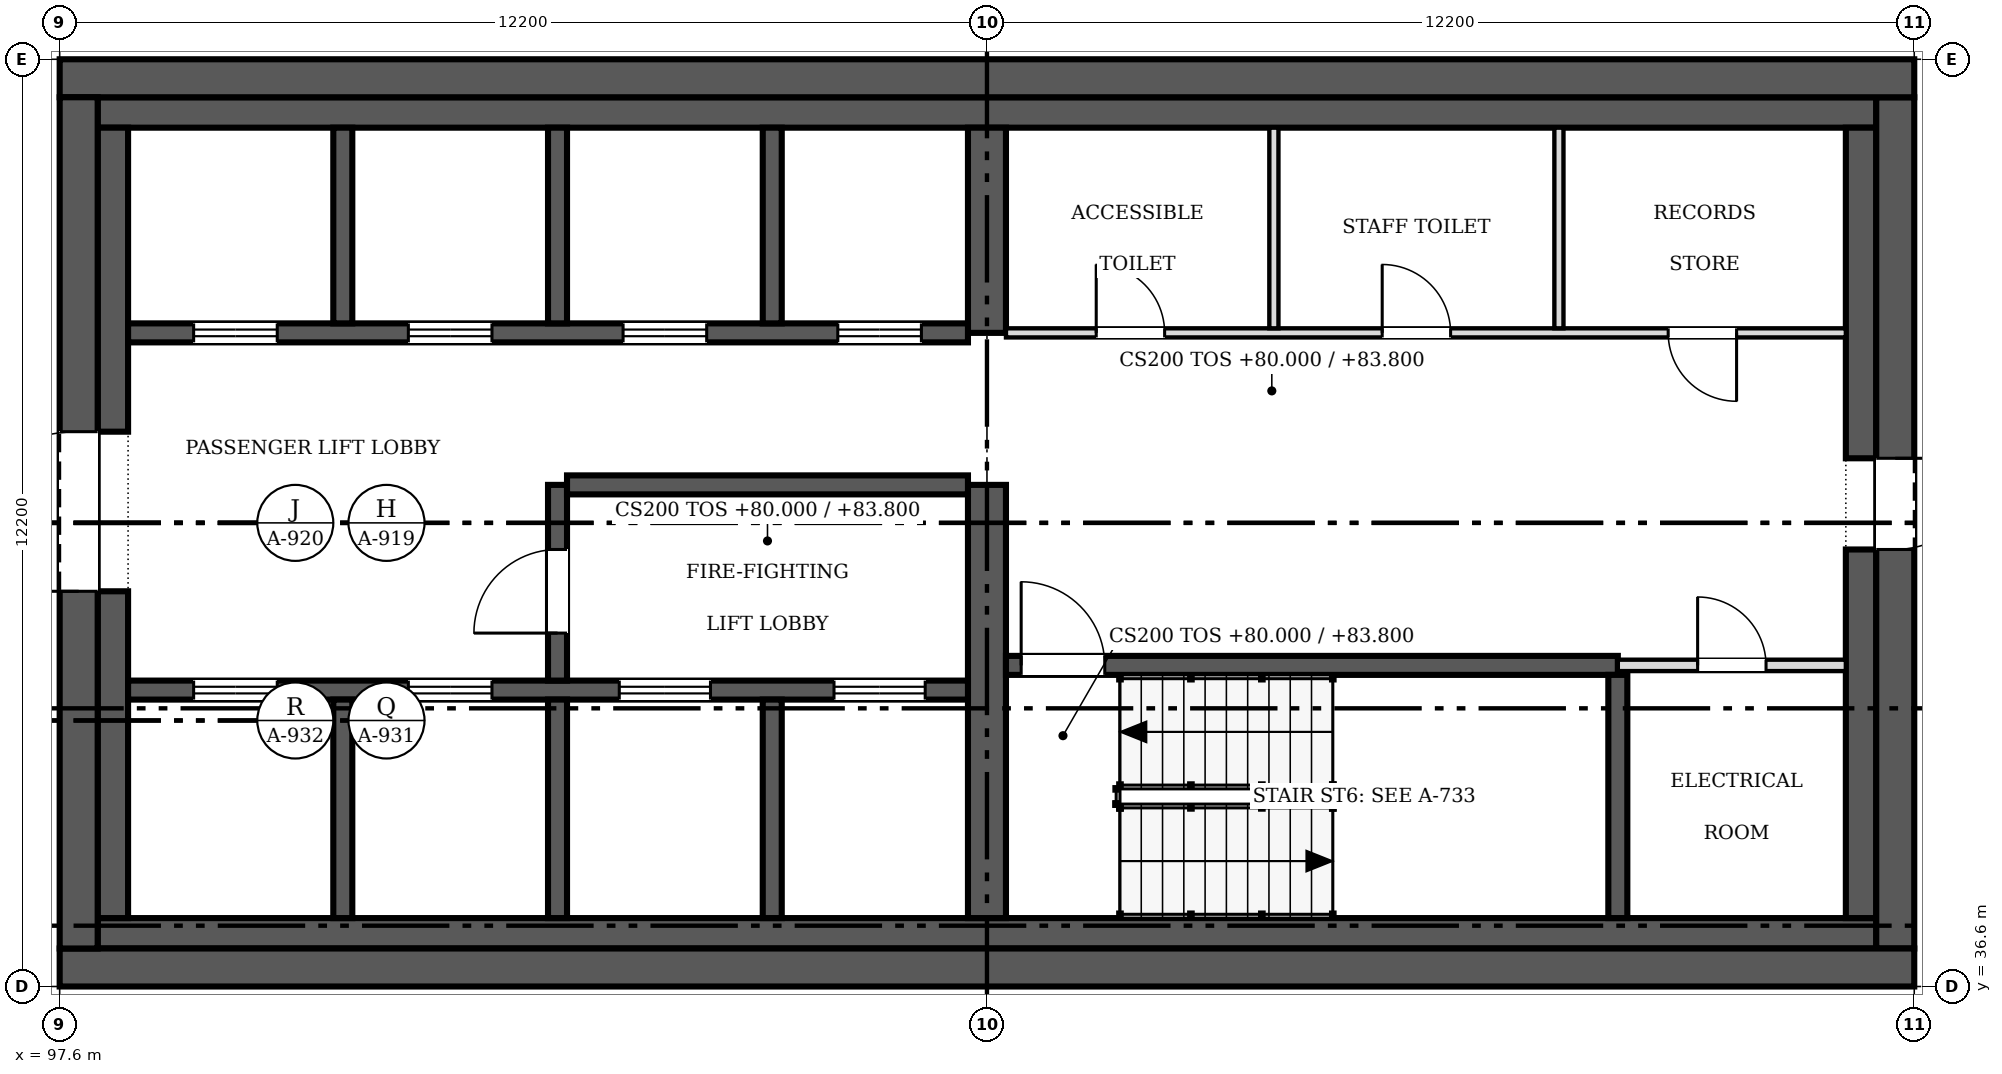
"""IFC4 building model, lengths in metres.
Left out: names, types, materials, properties, quantities, classifications, styles, units other than length and angle.
Written with IfcOpenShell. Run it as: python <this file> out.ifc"""

import sys

from ifc_helpers import new_model, si_unit, direction, frame, frame_2d, origin, place, context, subcontext, project, spatial, rectangle, extrude, source, transform, mapped, element, fill, save


model = new_model("IFC4")
c1 = context("Model", 3, precision=1e-05, world=origin(), true_north=direction((0.0, 1.0)))
c2 = subcontext(c1, "Body", "Model", "MODEL_VIEW")
j1 = project(units=[si_unit("LENGTHUNIT", "METRE"), si_unit("PLANEANGLEUNIT", "RADIAN")], contexts=[c1])
p1 = place(None, origin())
s1 = spatial("IfcSite", under=j1, at=p1, CompositionType="ELEMENT")
p2 = place(p1, origin())
s2 = spatial("IfcBuilding", under=s1, at=p2, CompositionType="ELEMENT")
p3 = place(p2, frame((0.0, 0.0, 80.0)))
s3 = spatial("IfcBuildingStorey", under=s2, at=p3, CompositionType="ELEMENT", Elevation=80.0)
p4 = place(p3, frame((122.0, 36.85, 0.0), z_axis=(0.0, 0.0, 1.0), x_axis=(-1.0, 0.0, 0.0)))
e1 = element("IfcWall", 1, at=p4, inside=s3, PredefinedType="SHEAR", context=c2, shape_type="SweptSolid", body=[
    extrude(rectangle(XDim=24.4, YDim=0.5, at=frame_2d((12.2, 0.0))), origin(), (0.0, 0.0, 1.0), 3.8),
])
p5 = place(p3, frame((97.85, 37.1, 0.0), z_axis=(0.0, 0.0, 1.0), x_axis=(0.0, 1.0, 0.0)))
e2 = element("IfcWall", 2, at=p5, inside=s3, PredefinedType="SHEAR", context=c2, shape_type="SweptSolid", body=[
    extrude(rectangle(XDim=11.2, YDim=0.5, at=frame_2d((5.6, 0.0))), origin(), (0.0, 0.0, 1.0), 3.8),
])
m1 = source(origin(), c2, "Body", "SweptSolid", [
    extrude(rectangle(XDim=2.1, YDim=2.4, at=frame_2d((1.05, 1.2))), frame((0.0, 0.26, 0.0), z_axis=(0.0, -1.0, 0.0), x_axis=(1.0, 0.0, 0.0)), (0.0, 0.0, 1.0), 0.52),
])
p6 = place(p5, frame((4.7, 0.0, 0.0)))
e3 = element("IfcOpeningElement", 3, at=p6, cuts=e2, PredefinedType="OPENING", context=c2, shape_type="MappedRepresentation", body=[
    mapped(m1, transform((0.0, 0.0, 0.0), scale=1.0)),
])
p7 = place(p3, frame((97.6, 48.55, 0.0), z_axis=(0.0, 0.0, 1.0), x_axis=(1.0, 0.0, 0.0)))
e4 = element("IfcWall", 4, at=p7, inside=s3, PredefinedType="SHEAR", context=c2, shape_type="SweptSolid", body=[
    extrude(rectangle(XDim=24.4, YDim=0.5, at=frame_2d((12.2, 0.0))), origin(), (0.0, 0.0, 1.0), 3.8),
])
p8 = place(p3, frame((121.75, 48.3, 0.0), z_axis=(0.0, 0.0, 1.0), x_axis=(0.0, -1.0, 0.0)))
e5 = element("IfcWall", 5, at=p8, inside=s3, PredefinedType="SHEAR", context=c2, shape_type="SweptSolid", body=[
    extrude(rectangle(XDim=11.2, YDim=0.5, at=frame_2d((5.6, 0.0))), origin(), (0.0, 0.0, 1.0), 3.8),
])
m2 = source(origin(), c2, "Body", "SweptSolid", [
    extrude(rectangle(XDim=1.2, YDim=2.1, at=frame_2d((0.6, 1.05))), frame((0.0, 0.26, 0.0), z_axis=(0.0, -1.0, 0.0), x_axis=(1.0, 0.0, 0.0)), (0.0, 0.0, 1.0), 0.52),
])
p9 = place(p8, frame((4.75, 0.0, 0.0)))
e6 = element("IfcOpeningElement", 6, at=p9, cuts=e5, PredefinedType="OPENING", context=c2, shape_type="MappedRepresentation", body=[
    mapped(m2, transform((0.0, 0.0, 0.0), scale=1.0)),
])
for number, where, z_axis, x_axis in (
    (7, (98.1, 37.3, 0.0), (0.0, 0.0, 1.0), (1.0, 0.0, 0.0)),
    (8, (98.1, 48.1, 0.0), (0.0, 0.0, 1.0), (1.0, 0.0, 0.0)),
):
    element("IfcWall", number, at=place(p3, frame(where, z_axis=z_axis, x_axis=x_axis)), inside=s3, PredefinedType="SOLIDWALL", context=c2, shape_type="SweptSolid", body=[
        extrude(rectangle(XDim=23.4, YDim=0.4, at=frame_2d((11.7, 0.0))), origin(), (0.0, 0.0, 1.0), 3.8),
    ])
p10 = place(p3, frame((98.3, 37.5, 0.0), z_axis=(0.0, 0.0, 1.0), x_axis=(0.0, 1.0, 0.0)))
e9 = element("IfcWall", 9, at=p10, inside=s3, PredefinedType="SOLIDWALL", context=c2, shape_type="SweptSolid", body=[
    extrude(rectangle(XDim=4.3, YDim=0.4, at=frame_2d((2.15, 0.0))), origin(), (0.0, 0.0, 1.0), 3.8),
])
p11 = place(p3, frame((98.3, 43.9, 0.0), z_axis=(0.0, 0.0, 1.0), x_axis=(0.0, 1.0, 0.0)))
e10 = element("IfcWall", 10, at=p11, inside=s3, PredefinedType="SOLIDWALL", context=c2, shape_type="SweptSolid", body=[
    extrude(rectangle(XDim=4.0, YDim=0.4, at=frame_2d((2.0, 0.0))), origin(), (0.0, 0.0, 1.0), 3.8),
])
p12 = place(p3, frame((121.3, 37.5, 0.0), z_axis=(0.0, 0.0, 1.0), x_axis=(0.0, 1.0, 0.0)))
e11 = element("IfcWall", 11, at=p12, inside=s3, PredefinedType="SOLIDWALL", context=c2, shape_type="SweptSolid", body=[
    extrude(rectangle(XDim=4.85, YDim=0.4, at=frame_2d((2.425, 0.0))), origin(), (0.0, 0.0, 1.0), 3.8),
])
p13 = place(p3, frame((121.3, 43.55, 0.0), z_axis=(0.0, 0.0, 1.0), x_axis=(0.0, 1.0, 0.0)))
e12 = element("IfcWall", 12, at=p13, inside=s3, PredefinedType="SOLIDWALL", context=c2, shape_type="SweptSolid", body=[
    extrude(rectangle(XDim=4.35, YDim=0.4, at=frame_2d((2.175, 0.0))), origin(), (0.0, 0.0, 1.0), 3.8),
])
p14 = place(p3, frame((109.8, 37.5, 0.0), z_axis=(0.0, 0.0, 1.0), x_axis=(0.0, 1.0, 0.0)))
e13 = element("IfcWall", 13, at=p14, inside=s3, PredefinedType="SHEAR", context=c2, shape_type="SweptSolid", body=[
    extrude(rectangle(XDim=5.7, YDim=0.5, at=frame_2d((2.85, 0.0))), origin(), (0.0, 0.0, 1.0), 3.8),
])
p15 = place(p3, frame((109.8, 45.2, 0.0), z_axis=(0.0, 0.0, 1.0), x_axis=(0.0, 1.0, 0.0)))
e14 = element("IfcWall", 14, at=p15, inside=s3, PredefinedType="SHEAR", context=c2, shape_type="SweptSolid", body=[
    extrude(rectangle(XDim=2.7, YDim=0.5, at=frame_2d((1.35, 0.0))), origin(), (0.0, 0.0, 1.0), 3.8),
])
p16 = place(p3, frame((98.5, 40.5, 0.0), z_axis=(0.0, 0.0, 1.0), x_axis=(1.0, 0.0, 0.0)))
e15 = element("IfcWall", 15, at=p16, inside=s3, PredefinedType="SOLIDWALL", context=c2, shape_type="SweptSolid", body=[
    extrude(rectangle(XDim=11.05, YDim=0.25, at=frame_2d((5.525, 0.0))), origin(), (0.0, 0.0, 1.0), 3.8),
])
m3 = source(origin(), c2, "Body", "SweptSolid", [
    extrude(rectangle(XDim=1.1, YDim=2.1, at=frame_2d((0.55, 1.05))), frame((0.0, 0.135, 0.0), z_axis=(0.0, -1.0, 0.0), x_axis=(1.0, 0.0, 0.0)), (0.0, 0.0, 1.0), 0.27),
])
p17 = place(p16, frame((0.863, 0.0, 0.0)))
e16 = element("IfcOpeningElement", 16, at=p17, cuts=e15, PredefinedType="OPENING", context=c2, shape_type="MappedRepresentation", body=[
    mapped(m3, transform((0.0, 0.0, 0.0), scale=1.0)),
])
p18 = place(p16, frame((3.688, 0.0, 0.0)))
e17 = element("IfcOpeningElement", 17, at=p18, cuts=e15, PredefinedType="OPENING", context=c2, shape_type="MappedRepresentation", body=[
    mapped(m3, transform((0.0, 0.0, 0.0), scale=1.0)),
])
m4 = source(origin(), c2, "Body", "SweptSolid", [
    extrude(rectangle(XDim=1.2, YDim=2.1, at=frame_2d((0.6, 1.05))), frame((0.0, 0.135, 0.0), z_axis=(0.0, -1.0, 0.0), x_axis=(1.0, 0.0, 0.0)), (0.0, 0.0, 1.0), 0.27),
])
p19 = place(p16, frame((6.462, 0.0, 0.0)))
e18 = element("IfcOpeningElement", 18, at=p19, cuts=e15, PredefinedType="OPENING", context=c2, shape_type="MappedRepresentation", body=[
    mapped(m4, transform((0.0, 0.0, 0.0), scale=1.0)),
])
p20 = place(p16, frame((9.288, 0.0, 0.0)))
e19 = element("IfcOpeningElement", 19, at=p20, cuts=e15, PredefinedType="OPENING", context=c2, shape_type="MappedRepresentation", body=[
    mapped(m4, transform((0.0, 0.0, 0.0), scale=1.0)),
])
p21 = place(p3, frame((109.55, 45.2, 0.0), z_axis=(0.0, 0.0, 1.0), x_axis=(-1.0, 0.0, 0.0)))
e20 = element("IfcWall", 20, at=p21, inside=s3, PredefinedType="SOLIDWALL", context=c2, shape_type="SweptSolid", body=[
    extrude(rectangle(XDim=11.05, YDim=0.25, at=frame_2d((5.525, 0.0))), origin(), (0.0, 0.0, 1.0), 3.8),
])
p22 = place(p21, frame((9.087, 0.0, 0.0)))
e21 = element("IfcOpeningElement", 21, at=p22, cuts=e20, PredefinedType="OPENING", context=c2, shape_type="MappedRepresentation", body=[
    mapped(m3, transform((0.0, 0.0, 0.0), scale=1.0)),
])
p23 = place(p21, frame((6.262, 0.0, 0.0)))
e22 = element("IfcOpeningElement", 22, at=p23, cuts=e20, PredefinedType="OPENING", context=c2, shape_type="MappedRepresentation", body=[
    mapped(m3, transform((0.0, 0.0, 0.0), scale=1.0)),
])
p24 = place(p21, frame((3.438, 0.0, 0.0)))
e23 = element("IfcOpeningElement", 23, at=p24, cuts=e20, PredefinedType="OPENING", context=c2, shape_type="MappedRepresentation", body=[
    mapped(m3, transform((0.0, 0.0, 0.0), scale=1.0)),
])
p25 = place(p21, frame((0.613, 0.0, 0.0)))
e24 = element("IfcOpeningElement", 24, at=p25, cuts=e20, PredefinedType="OPENING", context=c2, shape_type="MappedRepresentation", body=[
    mapped(m3, transform((0.0, 0.0, 0.0), scale=1.0)),
])
p26 = place(p3, frame((118.1, 40.825, 0.0), z_axis=(0.0, 0.0, 1.0), x_axis=(-1.0, 0.0, 0.0)))
e25 = element("IfcWall", 25, at=p26, inside=s3, PredefinedType="SOLIDWALL", context=c2, shape_type="SweptSolid", body=[
    extrude(rectangle(XDim=8.05, YDim=0.25, at=frame_2d((4.025, 0.0))), origin(), (0.0, 0.0, 1.0), 3.8),
])
p27 = place(p26, frame((6.75, 0.0, 0.0)))
e26 = element("IfcOpeningElement", 26, at=p27, cuts=e25, PredefinedType="OPENING", context=c2, shape_type="MappedRepresentation", body=[
    mapped(m3, transform((0.0, 0.0, 0.0), scale=1.0)),
])
p28 = place(p3, frame((104.15, 37.5, 0.0), z_axis=(0.0, 0.0, 1.0), x_axis=(0.0, 1.0, 0.0)))
e27 = element("IfcWall", 27, at=p28, inside=s3, PredefinedType="SOLIDWALL", context=c2, shape_type="SweptSolid", body=[
    extrude(rectangle(XDim=2.875, YDim=0.25, at=frame_2d((1.438, 0.0))), origin(), (0.0, 0.0, 1.0), 3.8),
])
p29 = place(p3, frame((104.15, 43.2, 0.0), z_axis=(0.0, 0.0, 1.0), x_axis=(0.0, -1.0, 0.0)))
e28 = element("IfcWall", 28, at=p29, inside=s3, PredefinedType="SOLIDWALL", context=c2, shape_type="SweptSolid", body=[
    extrude(rectangle(XDim=2.575, YDim=0.25, at=frame_2d((1.288, 0.0))), origin(), (0.0, 0.0, 1.0), 3.8),
])
p30 = place(p29, frame((0.85, 0.0, 0.0)))
e29 = element("IfcOpeningElement", 29, at=p30, cuts=e28, PredefinedType="OPENING", context=c2, shape_type="MappedRepresentation", body=[
    mapped(m3, transform((0.0, 0.0, 0.0), scale=1.0)),
])
p31 = place(p3, frame((104.275, 43.2, 0.0), z_axis=(0.0, 0.0, 1.0), x_axis=(1.0, 0.0, 0.0)))
e30 = element("IfcWall", 30, at=p31, inside=s3, PredefinedType="SOLIDWALL", context=c2, shape_type="SweptSolid", body=[
    extrude(rectangle(XDim=5.275, YDim=0.25, at=frame_2d((2.638, 0.0))), origin(), (0.0, 0.0, 1.0), 3.8),
])
p32 = place(p3, frame((118.1, 37.5, 0.0), z_axis=(0.0, 0.0, 1.0), x_axis=(0.0, 1.0, 0.0)))
e31 = element("IfcWall", 31, at=p32, inside=s3, PredefinedType="SOLIDWALL", context=c2, shape_type="SweptSolid", body=[
    extrude(rectangle(XDim=3.2, YDim=0.25, at=frame_2d((1.6, 0.0))), origin(), (0.0, 0.0, 1.0), 3.8),
])
for number, where, z_axis, x_axis in (
    (32, (101.325, 37.5, 0.0), (0.0, 0.0, 1.0), (0.0, 1.0, 0.0)),
    (33, (106.975, 37.5, 0.0), (0.0, 0.0, 1.0), (0.0, 1.0, 0.0)),
):
    element("IfcWall", number, at=place(p3, frame(where, z_axis=z_axis, x_axis=x_axis)), inside=s3, PredefinedType="SOLIDWALL", context=c2, shape_type="SweptSolid", body=[
        extrude(rectangle(XDim=2.875, YDim=0.25, at=frame_2d((1.438, 0.0))), origin(), (0.0, 0.0, 1.0), 3.8),
    ])
for number, where, z_axis, x_axis in (
    (34, (101.325, 45.325, 0.0), (0.0, 0.0, 1.0), (0.0, 1.0, 0.0)),
    (35, (104.15, 45.325, 0.0), (0.0, 0.0, 1.0), (0.0, 1.0, 0.0)),
    (36, (106.975, 45.325, 0.0), (0.0, 0.0, 1.0), (0.0, 1.0, 0.0)),
):
    element("IfcWall", number, at=place(p3, frame(where, z_axis=z_axis, x_axis=x_axis)), inside=s3, PredefinedType="SOLIDWALL", context=c2, shape_type="SweptSolid", body=[
        extrude(rectangle(XDim=2.575, YDim=0.25, at=frame_2d((1.288, 0.0))), origin(), (0.0, 0.0, 1.0), 3.8),
    ])
p33 = place(p3, frame((110.05, 45.2, 0.0), z_axis=(0.0, 0.0, 1.0), x_axis=(1.0, 0.0, 0.0)))
e37 = element("IfcWall", 37, at=p33, inside=s3, PredefinedType="PARTITIONING", context=c2, shape_type="SweptSolid", body=[
    extrude(rectangle(XDim=11.05, YDim=0.12, at=frame_2d((5.525, 0.0))), origin(), (0.0, 0.0, 1.0), 3.6),
])
m5 = source(origin(), c2, "Body", "SweptSolid", [
    extrude(rectangle(XDim=0.9, YDim=2.1, at=frame_2d((0.45, 1.05))), frame((0.0, 0.07, 0.0), z_axis=(0.0, -1.0, 0.0), x_axis=(1.0, 0.0, 0.0)), (0.0, 0.0, 1.0), 0.14),
])
p34 = place(p33, frame((1.188, 0.0, 0.0)))
e38 = element("IfcOpeningElement", 38, at=p34, cuts=e37, PredefinedType="OPENING", context=c2, shape_type="MappedRepresentation", body=[
    mapped(m5, transform((0.0, 0.0, 0.0), scale=1.0)),
])
p35 = place(p33, frame((4.95, 0.0, 0.0)))
e39 = element("IfcOpeningElement", 39, at=p35, cuts=e37, PredefinedType="OPENING", context=c2, shape_type="MappedRepresentation", body=[
    mapped(m5, transform((0.0, 0.0, 0.0), scale=1.0)),
])
p36 = place(p33, frame((8.712, 0.0, 0.0)))
e40 = element("IfcOpeningElement", 40, at=p36, cuts=e37, PredefinedType="OPENING", context=c2, shape_type="MappedRepresentation", body=[
    mapped(m5, transform((0.0, 0.0, 0.0), scale=1.0)),
])
p37 = place(p3, frame((121.1, 40.825, 0.0), z_axis=(0.0, 0.0, 1.0), x_axis=(-1.0, 0.0, 0.0)))
e41 = element("IfcWall", 41, at=p37, inside=s3, PredefinedType="PARTITIONING", context=c2, shape_type="SweptSolid", body=[
    extrude(rectangle(XDim=3.0, YDim=0.15, at=frame_2d((1.5, 0.0))), origin(), (0.0, 0.0, 1.0), 3.6),
])
m6 = source(origin(), c2, "Body", "SweptSolid", [
    extrude(rectangle(XDim=0.9, YDim=2.1, at=frame_2d((0.45, 1.05))), frame((0.0, 0.085, 0.0), z_axis=(0.0, -1.0, 0.0), x_axis=(1.0, 0.0, 0.0)), (0.0, 0.0, 1.0), 0.17),
])
p38 = place(p37, frame((1.05, 0.0, 0.0)))
e42 = element("IfcOpeningElement", 42, at=p38, cuts=e41, PredefinedType="OPENING", context=c2, shape_type="MappedRepresentation", body=[
    mapped(m6, transform((0.0, 0.0, 0.0), scale=1.0)),
])
for number, where, z_axis, x_axis in (
    (43, (113.575, 45.26, 0.0), (0.0, 0.0, 1.0), (0.0, 1.0, 0.0)),
    (44, (117.325, 45.26, 0.0), (0.0, 0.0, 1.0), (0.0, 1.0, 0.0)),
):
    element("IfcWall", number, at=place(p3, frame(where, z_axis=z_axis, x_axis=x_axis)), inside=s3, PredefinedType="PARTITIONING", context=c2, shape_type="SweptSolid", body=[
        extrude(rectangle(XDim=2.64, YDim=0.12, at=frame_2d((1.32, 0.0))), origin(), (0.0, 0.0, 1.0), 3.6),
    ])
m7 = source(origin(), c2, "Body", "SweptSolid", [
    extrude(rectangle(XDim=2.1, YDim=2.4, at=frame_2d((1.05, 1.2))), frame((0.0, 0.025, 0.0), z_axis=(0.0, -1.0, 0.0), x_axis=(1.0, 0.0, 0.0)), (0.0, 0.0, 1.0), 0.05),
])
p39 = place(p6, origin())
e45 = element("IfcDoor", 45, at=p39, inside=s3, OperationType="DOUBLE_DOOR_SINGLE_SWING", PredefinedType="DOOR", context=c2, shape_type="MappedRepresentation", body=[
    mapped(m7, transform((0.0, 0.0, 0.0), scale=1.0)),
])
fill(e3, e45)
m8 = source(origin(), c2, "Body", "SweptSolid", [
    extrude(rectangle(XDim=1.2, YDim=2.1, at=frame_2d((0.6, 1.05))), frame((0.0, 0.025, 0.0), z_axis=(0.0, -1.0, 0.0), x_axis=(1.0, 0.0, 0.0)), (0.0, 0.0, 1.0), 0.05),
])
p40 = place(p9, origin())
e46 = element("IfcDoor", 46, at=p40, inside=s3, OperationType="SINGLE_SWING_LEFT", PredefinedType="DOOR", context=c2, shape_type="MappedRepresentation", body=[
    mapped(m8, transform((0.0, 0.0, 0.0), scale=1.0)),
])
fill(e6, e46)
m9 = source(origin(), c2, "Body", "SweptSolid", [
    extrude(rectangle(XDim=1.1, YDim=2.1, at=frame_2d((0.55, 1.05))), frame((0.0, 0.025, 0.0), z_axis=(0.0, -1.0, 0.0), x_axis=(1.0, 0.0, 0.0)), (0.0, 0.0, 1.0), 0.05),
])
p41 = place(p17, origin())
e47 = element("IfcDoor", 47, at=p41, inside=s3, OperationType="DOUBLE_DOOR_SLIDING", PredefinedType="DOOR", context=c2, shape_type="MappedRepresentation", body=[
    mapped(m9, transform((0.0, 0.0, 0.0), scale=1.0)),
])
fill(e16, e47)
p42 = place(p18, origin())
e48 = element("IfcDoor", 48, at=p42, inside=s3, OperationType="DOUBLE_DOOR_SLIDING", PredefinedType="DOOR", context=c2, shape_type="MappedRepresentation", body=[
    mapped(m9, transform((0.0, 0.0, 0.0), scale=1.0)),
])
fill(e17, e48)
p43 = place(p19, origin())
e49 = element("IfcDoor", 49, at=p43, inside=s3, OperationType="DOUBLE_DOOR_SLIDING", PredefinedType="DOOR", context=c2, shape_type="MappedRepresentation", body=[
    mapped(m8, transform((0.0, 0.0, 0.0), scale=1.0)),
])
fill(e18, e49)
p44 = place(p20, origin())
e50 = element("IfcDoor", 50, at=p44, inside=s3, OperationType="DOUBLE_DOOR_SLIDING", PredefinedType="DOOR", context=c2, shape_type="MappedRepresentation", body=[
    mapped(m8, transform((0.0, 0.0, 0.0), scale=1.0)),
])
fill(e19, e50)
p45 = place(p22, origin())
e51 = element("IfcDoor", 51, at=p45, inside=s3, OperationType="DOUBLE_DOOR_SLIDING", PredefinedType="DOOR", context=c2, shape_type="MappedRepresentation", body=[
    mapped(m9, transform((0.0, 0.0, 0.0), scale=1.0)),
])
fill(e21, e51)
p46 = place(p23, origin())
e52 = element("IfcDoor", 52, at=p46, inside=s3, OperationType="DOUBLE_DOOR_SLIDING", PredefinedType="DOOR", context=c2, shape_type="MappedRepresentation", body=[
    mapped(m9, transform((0.0, 0.0, 0.0), scale=1.0)),
])
fill(e22, e52)
p47 = place(p24, origin())
e53 = element("IfcDoor", 53, at=p47, inside=s3, OperationType="DOUBLE_DOOR_SLIDING", PredefinedType="DOOR", context=c2, shape_type="MappedRepresentation", body=[
    mapped(m9, transform((0.0, 0.0, 0.0), scale=1.0)),
])
fill(e23, e53)
p48 = place(p25, origin())
e54 = element("IfcDoor", 54, at=p48, inside=s3, OperationType="DOUBLE_DOOR_SLIDING", PredefinedType="DOOR", context=c2, shape_type="MappedRepresentation", body=[
    mapped(m9, transform((0.0, 0.0, 0.0), scale=1.0)),
])
fill(e24, e54)
p49 = place(p27, origin())
e55 = element("IfcDoor", 55, at=p49, inside=s3, OperationType="SINGLE_SWING_RIGHT", PredefinedType="DOOR", context=c2, shape_type="MappedRepresentation", body=[
    mapped(m9, transform((0.0, 0.0, 0.0), scale=1.0)),
])
fill(e26, e55)
p50 = place(p30, origin())
e56 = element("IfcDoor", 56, at=p50, inside=s3, OperationType="SINGLE_SWING_RIGHT", PredefinedType="DOOR", context=c2, shape_type="MappedRepresentation", body=[
    mapped(m9, transform((0.0, 0.0, 0.0), scale=1.0)),
])
fill(e29, e56)
m10 = source(origin(), c2, "Body", "SweptSolid", [
    extrude(rectangle(XDim=0.9, YDim=2.1, at=frame_2d((0.45, 1.05))), frame((0.0, 0.025, 0.0), z_axis=(0.0, -1.0, 0.0), x_axis=(1.0, 0.0, 0.0)), (0.0, 0.0, 1.0), 0.05),
])
p51 = place(p34, origin())
e57 = element("IfcDoor", 57, at=p51, inside=s3, OperationType="SINGLE_SWING_LEFT", PredefinedType="DOOR", context=c2, shape_type="MappedRepresentation", body=[
    mapped(m10, transform((0.0, 0.0, 0.0), scale=1.0)),
])
fill(e38, e57)
p52 = place(p35, origin())
e58 = element("IfcDoor", 58, at=p52, inside=s3, OperationType="SINGLE_SWING_LEFT", PredefinedType="DOOR", context=c2, shape_type="MappedRepresentation", body=[
    mapped(m10, transform((0.0, 0.0, 0.0), scale=1.0)),
])
fill(e39, e58)
p53 = place(p36, origin())
e59 = element("IfcDoor", 59, at=p53, inside=s3, OperationType="SINGLE_SWING_RIGHT", PredefinedType="DOOR", context=c2, shape_type="MappedRepresentation", body=[
    mapped(m10, transform((0.0, 0.0, 0.0), scale=1.0)),
])
fill(e40, e59)
p54 = place(p38, origin())
e60 = element("IfcDoor", 60, at=p54, inside=s3, OperationType="SINGLE_SWING_RIGHT", PredefinedType="DOOR", context=c2, shape_type="MappedRepresentation", body=[
    mapped(m10, transform((0.0, 0.0, 0.0), scale=1.0)),
])
fill(e42, e60)
save(model, sys.argv[1])
